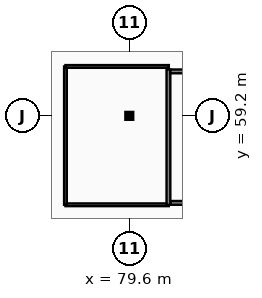
"""IFC4 building model, lengths in metres.
Left out: names, types, materials, properties, quantities, classifications, styles, units other than length and angle.
Written with IfcOpenShell. Run it as: python <this file> out.ifc"""

import sys

from ifc_helpers import new_model, si_unit, direction, frame, frame_2d, origin, origin_2d, place, context, subcontext, project, spatial, rectangle, extrude, element, fill, save


model = new_model("IFC4")
c1 = context("Model", 3, precision=1e-05, world=origin(), true_north=direction((0.0, 1.0)))
c2 = subcontext(c1, "Body", "Model", "MODEL_VIEW")
j1 = project(units=[si_unit("LENGTHUNIT", "METRE"), si_unit("PLANEANGLEUNIT", "RADIAN")], contexts=[c1])
p1 = place(None, origin())
s1 = spatial("IfcSite", under=j1, at=p1, CompositionType="ELEMENT")
p2 = place(p1, origin())
s2 = spatial("IfcBuilding", under=s1, at=p2, CompositionType="ELEMENT")
p3 = place(p2, frame((0.0, 0.0, 17.7)))
s3 = spatial("IfcBuildingStorey", under=s2, at=p3, CompositionType="ELEMENT", Elevation=17.7)
p4 = place(p3, frame((79.6, 59.2, 0.0), z_axis=(0.0, 0.0, 1.0), x_axis=(1.0, 0.0, 0.0)))
e1 = element("IfcColumn", 1, at=p4, inside=s3, PredefinedType="COLUMN", context=c2, shape_type="SweptSolid", body=[
    extrude(rectangle(XDim=0.36, YDim=0.36, at=origin_2d()), origin(), (0.0, 0.0, 1.0), 3.9),
])
p5 = place(p3, frame((75.4, 53.35, 0.0), z_axis=(0.0, 0.0, 1.0), x_axis=(1.0, 0.0, 0.0)))
e2 = element("IfcWall", 2, at=p5, inside=s3, PredefinedType="PARTITIONING", context=c2, shape_type="SweptSolid", body=[
    extrude(rectangle(XDim=6.8, YDim=0.18, at=frame_2d((3.4, 0.0))), origin(), (0.0, 0.0, 1.0), 3.23),
])
p6 = place(p3, frame((75.4, 53.35, 0.0), z_axis=(0.0, 0.0, 1.0), x_axis=(0.0, 1.0, 0.0)))
e3 = element("IfcWall", 3, at=p6, inside=s3, PredefinedType="PARTITIONING", context=c2, shape_type="SweptSolid", body=[
    extrude(rectangle(XDim=9.1, YDim=0.18, at=frame_2d((4.55, 0.0))), origin(), (0.0, 0.0, 1.0), 3.32),
])
p7 = place(p6, frame((4.05, 0.0, -0.01)))
e4 = element("IfcOpeningElement", 4, at=p7, cuts=e3, PredefinedType="OPENING", context=c2, shape_type="SweptSolid", body=[
    extrude(rectangle(XDim=1.0, YDim=2.16, at=frame_2d((0.5, 1.08))), frame((0.0, 0.1, 0.0), z_axis=(0.0, -1.0, 0.0), x_axis=(1.0, 0.0, 0.0)), (0.0, 0.0, 1.0), 0.2),
])
p8 = place(p3, frame((75.4, 62.45, 0.0), z_axis=(0.0, 0.0, 1.0), x_axis=(1.0, 0.0, 0.0)))
e5 = element("IfcWall", 5, at=p8, inside=s3, PredefinedType="PARTITIONING", context=c2, shape_type="SweptSolid", body=[
    extrude(rectangle(XDim=6.8, YDim=0.18, at=frame_2d((3.4, 0.0))), origin(), (0.0, 0.0, 1.0), 3.23),
])
p9 = place(p3, frame((82.3, 53.475, 0.0), z_axis=(0.0, 0.0, 1.0), x_axis=(1.0, 0.0, 0.0)))
e6 = element("IfcWall", 6, at=p9, inside=s3, PredefinedType="SHEAR", context=c2, shape_type="SweptSolid", body=[
    extrude(rectangle(XDim=3.5, YDim=0.25, at=frame_2d((1.75, 0.0))), origin(), (0.0, 0.0, 1.0), 3.9),
])
p10 = place(p9, frame((1.1, 0.0, -0.01)))
e7 = element("IfcOpeningElement", 7, at=p10, cuts=e6, PredefinedType="OPENING", context=c2, shape_type="SweptSolid", body=[
    extrude(rectangle(XDim=1.3, YDim=2.16, at=frame_2d((0.65, 1.08))), frame((0.0, 0.135, 0.0), z_axis=(0.0, -1.0, 0.0), x_axis=(1.0, 0.0, 0.0)), (0.0, 0.0, 1.0), 0.27),
])
p11 = place(p3, frame((82.175, 53.35, 0.0), z_axis=(0.0, 0.0, 1.0), x_axis=(0.0, 1.0, 0.0)))
e8 = element("IfcWall", 8, at=p11, inside=s3, PredefinedType="SHEAR", context=c2, shape_type="SweptSolid", body=[
    extrude(rectangle(XDim=8.9, YDim=0.25, at=frame_2d((4.45, 0.0))), origin(), (0.0, 0.0, 1.0), 3.9),
])
p12 = place(p3, frame((85.8, 62.125, 0.0), z_axis=(0.0, 0.0, 1.0), x_axis=(-1.0, 0.0, 0.0)))
e9 = element("IfcWall", 9, at=p12, inside=s3, PredefinedType="SHEAR", context=c2, shape_type="SweptSolid", body=[
    extrude(rectangle(XDim=3.5, YDim=0.25, at=frame_2d((1.75, 0.0))), origin(), (0.0, 0.0, 1.0), 3.9),
])
p13 = place(p7, frame((0.0, 0.0, 0.01)))
e10 = element("IfcDoor", 10, at=p13, inside=s3, OperationType="SINGLE_SWING_LEFT", PredefinedType="DOOR", context=c2, shape_type="SweptSolid", body=[
    extrude(rectangle(XDim=1.0, YDim=2.15, at=frame_2d((0.5, 1.075))), frame((0.0, 0.025, 0.0), z_axis=(0.0, -1.0, 0.0), x_axis=(1.0, 0.0, 0.0)), (0.0, 0.0, 1.0), 0.05),
])
fill(e4, e10)
save(model, sys.argv[1])
